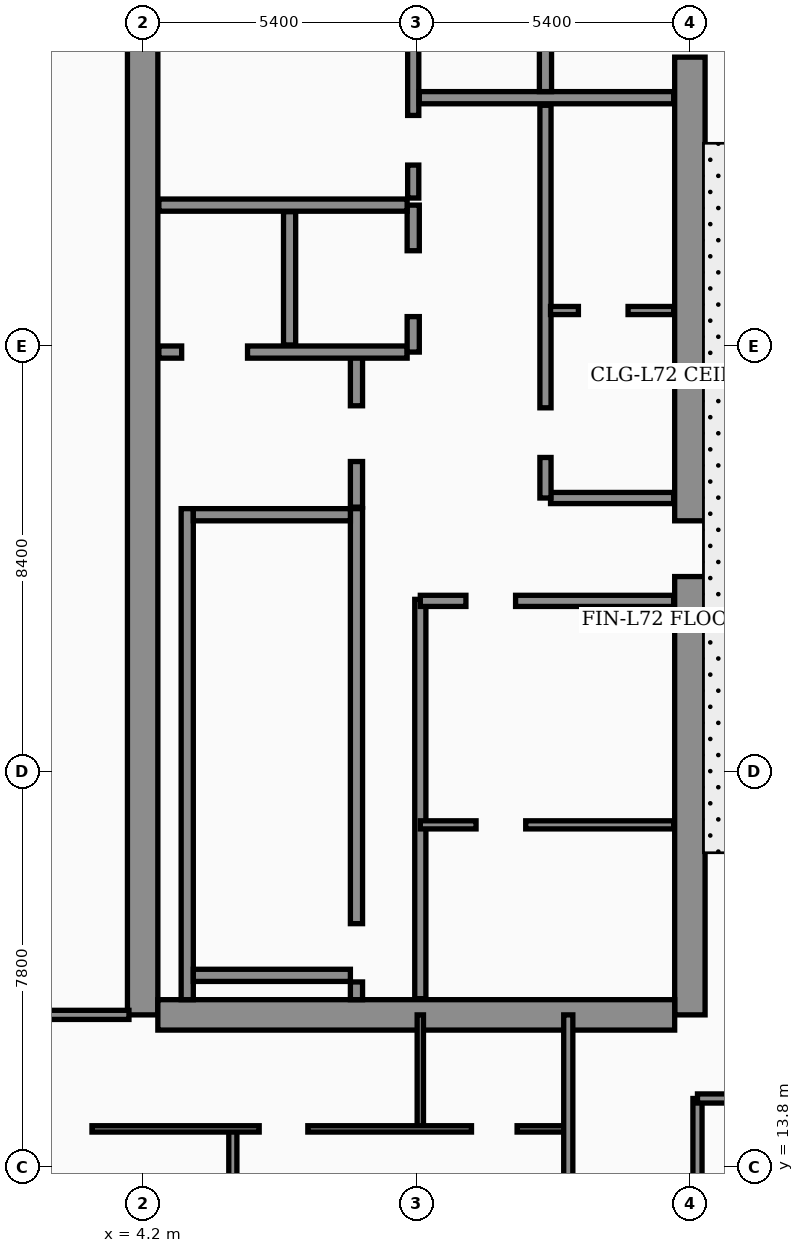
"""IFC4 building model, lengths in metres.
Left out: names, types, materials, properties, quantities, classifications, styles, units other than length and angle.
Written with IfcOpenShell. Run it as: python <this file> out.ifc"""

import sys

from ifc_helpers import new_model, si_unit, direction, frame, frame_2d, origin, place, context, subcontext, project, spatial, rectangle, extrude, element, fill, save


model = new_model("IFC4")
c1 = context("Model", 3, precision=1e-05, world=origin(), true_north=direction((0.0, 1.0)))
c2 = subcontext(c1, "Body", "Model", "MODEL_VIEW")
j1 = project(units=[si_unit("LENGTHUNIT", "METRE"), si_unit("PLANEANGLEUNIT", "RADIAN")], contexts=[c1])
p1 = place(None, origin())
s1 = spatial("IfcSite", under=j1, at=p1, CompositionType="ELEMENT")
p2 = place(p1, origin())
s2 = spatial("IfcBuilding", under=s1, at=p2, CompositionType="ELEMENT")
p3 = place(p2, frame((0.0, 0.0, 291.1)))
s3 = spatial("IfcBuildingStorey", under=s2, at=p3, CompositionType="ELEMENT", Elevation=291.1)
p4 = place(p3, frame((4.2, 16.8, 0.0), z_axis=(0.0, 0.0, 1.0), x_axis=(0.0, 1.0, 0.0)))
e1 = element("IfcWall", 1, at=p4, inside=s3, PredefinedType="SHEAR", context=c2, shape_type="SweptSolid", body=[
    extrude(rectangle(XDim=21.6, YDim=0.6, at=frame_2d((10.8, 0.0))), origin(), (0.0, 0.0, 1.0), 3.56),
])
p5 = place(p3, frame((15.0, 16.8, 0.0), z_axis=(0.0, 0.0, 1.0), x_axis=(0.0, 1.0, 0.0)))
e2 = element("IfcWall", 2, at=p5, inside=s3, PredefinedType="SHEAR", context=c2, shape_type="SweptSolid", body=[
    extrude(rectangle(XDim=21.6, YDim=0.6, at=frame_2d((10.8, 0.0))), origin(), (0.0, 0.0, 1.0), 3.56),
])
p6 = place(p5, frame((8.65, 0.0, 0.0)))
e3 = element("IfcOpeningElement", 3, at=p6, cuts=e2, PredefinedType="OPENING", context=c2, shape_type="SweptSolid", body=[
    extrude(rectangle(XDim=1.1, YDim=2.2, at=frame_2d((0.55, 1.1))), frame((0.0, 0.31, 0.0), z_axis=(0.0, -1.0, 0.0), x_axis=(1.0, 0.0, 0.0)), (0.0, 0.0, 1.0), 0.62),
])
p7 = place(p5, frame((18.9, 0.0, 0.0)))
e4 = element("IfcOpeningElement", 4, at=p7, cuts=e2, PredefinedType="OPENING", context=c2, shape_type="SweptSolid", body=[
    extrude(rectangle(XDim=1.1, YDim=2.2, at=frame_2d((0.55, 1.1))), frame((0.0, 0.31, 0.0), z_axis=(0.0, -1.0, 0.0), x_axis=(1.0, 0.0, 0.0)), (0.0, 0.0, 1.0), 0.62),
])
p8 = place(p3, frame((4.5, 16.8, 0.0), z_axis=(0.0, 0.0, 1.0), x_axis=(1.0, 0.0, 0.0)))
e5 = element("IfcWall", 5, at=p8, inside=s3, PredefinedType="SHEAR", context=c2, shape_type="SweptSolid", body=[
    extrude(rectangle(XDim=10.2, YDim=0.6, at=frame_2d((5.1, 0.0))), origin(), (0.0, 0.0, 1.0), 3.56),
])
p9 = place(p3, frame((5.08, 17.1, 0.0), z_axis=(0.0, 0.0, 1.0), x_axis=(0.0, 1.0, 0.0)))
e6 = element("IfcWall", 6, at=p9, inside=s3, PredefinedType="SOLIDWALL", context=c2, shape_type="SweptSolid", body=[
    extrude(rectangle(XDim=9.69, YDim=0.24, at=frame_2d((4.845, 0.0))), origin(), (0.0, 0.0, 1.0), 3.56),
])
p10 = place(p3, frame((8.42, 17.1, 0.0), z_axis=(0.0, 0.0, 1.0), x_axis=(0.0, 1.0, 0.0)))
e7 = element("IfcWall", 7, at=p10, inside=s3, PredefinedType="SOLIDWALL", context=c2, shape_type="SweptSolid", body=[
    extrude(rectangle(XDim=9.69, YDim=0.24, at=frame_2d((4.845, 0.0))), origin(), (0.0, 0.0, 1.0), 3.56),
])
p11 = place(p10, frame((0.35, 0.0, 0.0)))
e8 = element("IfcOpeningElement", 8, at=p11, cuts=e7, PredefinedType="OPENING", context=c2, shape_type="SweptSolid", body=[
    extrude(rectangle(XDim=1.15, YDim=2.2, at=frame_2d((0.575, 1.1))), frame((0.0, 0.13, 0.0), z_axis=(0.0, -1.0, 0.0), x_axis=(1.0, 0.0, 0.0)), (0.0, 0.0, 1.0), 0.26),
])
for number, where, z_axis, x_axis in (
    (9, (5.2, 17.58, 0.0), (0.0, 0.0, 1.0), (1.0, 0.0, 0.0)),
    (10, (5.2, 26.67, 0.0), (0.0, 0.0, 1.0), (1.0, 0.0, 0.0)),
):
    element("IfcWall", number, at=place(p3, frame(where, z_axis=z_axis, x_axis=x_axis)), inside=s3, PredefinedType="SOLIDWALL", context=c2, shape_type="SweptSolid", body=[
        extrude(rectangle(XDim=3.1, YDim=0.24, at=frame_2d((1.55, 0.0))), origin(), (0.0, 0.0, 1.0), 3.56),
    ])
p12 = place(p3, frame((8.42, 26.82, 0.0), z_axis=(0.0, 0.0, 1.0), x_axis=(0.0, 1.0, 0.0)))
e11 = element("IfcWall", 11, at=p12, inside=s3, PredefinedType="SOLIDWALL", context=c2, shape_type="SweptSolid", body=[
    extrude(rectangle(XDim=3.0, YDim=0.24, at=frame_2d((1.5, 0.0))), origin(), (0.0, 0.0, 1.0), 3.56),
])
p13 = place(p12, frame((0.9, 0.0, 0.0)))
e12 = element("IfcOpeningElement", 12, at=p13, cuts=e11, PredefinedType="OPENING", context=c2, shape_type="SweptSolid", body=[
    extrude(rectangle(XDim=1.1, YDim=2.2, at=frame_2d((0.55, 1.1))), frame((0.0, 0.13, 0.0), z_axis=(0.0, -1.0, 0.0), x_axis=(1.0, 0.0, 0.0)), (0.0, 0.0, 1.0), 0.26),
])
p14 = place(p3, frame((4.52, 29.88, 0.0), z_axis=(0.0, 0.0, 1.0), x_axis=(1.0, 0.0, 0.0)))
e13 = element("IfcWall", 13, at=p14, inside=s3, PredefinedType="SOLIDWALL", context=c2, shape_type="SweptSolid", body=[
    extrude(rectangle(XDim=4.9, YDim=0.24, at=frame_2d((2.45, 0.0))), origin(), (0.0, 0.0, 1.0), 3.56),
])
p15 = place(p14, frame((0.45, 0.0, 0.0)))
e14 = element("IfcOpeningElement", 14, at=p15, cuts=e13, PredefinedType="OPENING", context=c2, shape_type="SweptSolid", body=[
    extrude(rectangle(XDim=1.3, YDim=2.35, at=frame_2d((0.65, 1.175))), frame((0.0, 0.13, 0.0), z_axis=(0.0, -1.0, 0.0), x_axis=(1.0, 0.0, 0.0)), (0.0, 0.0, 1.0), 0.26),
])
p16 = place(p3, frame((7.1, 30.02, 0.0), z_axis=(0.0, 0.0, 1.0), x_axis=(0.0, 1.0, 0.0)))
e15 = element("IfcWall", 15, at=p16, inside=s3, PredefinedType="SOLIDWALL", context=c2, shape_type="SweptSolid", body=[
    extrude(rectangle(XDim=2.63, YDim=0.24, at=frame_2d((1.315, 0.0))), origin(), (0.0, 0.0, 1.0), 3.56),
])
p17 = place(p3, frame((9.54, 29.88, 0.0), z_axis=(0.0, 0.0, 1.0), x_axis=(0.0, 1.0, 0.0)))
e16 = element("IfcWall", 16, at=p17, inside=s3, PredefinedType="SOLIDWALL", context=c2, shape_type="SweptSolid", body=[
    extrude(rectangle(XDim=2.9, YDim=0.24, at=frame_2d((1.45, 0.0))), origin(), (0.0, 0.0, 1.0), 3.56),
])
p18 = place(p17, frame((0.7, 0.0, 0.0)))
e17 = element("IfcOpeningElement", 17, at=p18, cuts=e16, PredefinedType="OPENING", context=c2, shape_type="SweptSolid", body=[
    extrude(rectangle(XDim=1.3, YDim=2.35, at=frame_2d((0.65, 1.175))), frame((0.0, 0.13, 0.0), z_axis=(0.0, -1.0, 0.0), x_axis=(1.0, 0.0, 0.0)), (0.0, 0.0, 1.0), 0.26),
])
p19 = place(p3, frame((4.52, 32.78, 0.0), z_axis=(0.0, 0.0, 1.0), x_axis=(1.0, 0.0, 0.0)))
e18 = element("IfcWall", 18, at=p19, inside=s3, PredefinedType="SOLIDWALL", context=c2, shape_type="SweptSolid", body=[
    extrude(rectangle(XDim=4.9, YDim=0.24, at=frame_2d((2.45, 0.0))), origin(), (0.0, 0.0, 1.0), 3.19),
])
p20 = place(p3, frame((9.68, 17.12, 0.0), z_axis=(0.0, 0.0, 1.0), x_axis=(0.0, 1.0, 0.0)))
e19 = element("IfcWall", 19, at=p20, inside=s3, PredefinedType="SOLIDWALL", context=c2, shape_type="SweptSolid", body=[
    extrude(rectangle(XDim=7.88, YDim=0.22, at=frame_2d((3.94, 0.0))), origin(), (0.0, 0.0, 1.0), 3.56),
])
p21 = place(p3, frame((9.54, 32.92, 0.0), z_axis=(0.0, 0.0, 1.0), x_axis=(0.0, 1.0, 0.0)))
e20 = element("IfcWall", 20, at=p21, inside=s3, PredefinedType="SOLIDWALL", context=c2, shape_type="SweptSolid", body=[
    extrude(rectangle(XDim=5.16, YDim=0.22, at=frame_2d((2.58, 0.0))), origin(), (0.0, 0.0, 1.0), 3.56),
])
p22 = place(p21, frame((0.65, 0.0, 0.0)))
e21 = element("IfcOpeningElement", 21, at=p22, cuts=e20, PredefinedType="OPENING", context=c2, shape_type="SweptSolid", body=[
    extrude(rectangle(XDim=0.98, YDim=2.15, at=frame_2d((0.49, 1.075))), frame((0.0, 0.12, 0.0), z_axis=(0.0, -1.0, 0.0), x_axis=(1.0, 0.0, 0.0)), (0.0, 0.0, 1.0), 0.24),
])
p23 = place(p3, frame((9.68, 20.55, 0.0), z_axis=(0.0, 0.0, 1.0), x_axis=(1.0, 0.0, 0.0)))
e22 = element("IfcWall", 22, at=p23, inside=s3, PredefinedType="PARTITIONING", context=c2, shape_type="SweptSolid", body=[
    extrude(rectangle(XDim=5.0, YDim=0.16, at=frame_2d((2.5, 0.0))), origin(), (0.0, 0.0, 1.0), 3.56),
])
p24 = place(p23, frame((1.1, 0.0, 0.0)))
e23 = element("IfcOpeningElement", 23, at=p24, cuts=e22, PredefinedType="OPENING", context=c2, shape_type="SweptSolid", body=[
    extrude(rectangle(XDim=0.98, YDim=2.15, at=frame_2d((0.49, 1.075))), frame((0.0, 0.09, 0.0), z_axis=(0.0, -1.0, 0.0), x_axis=(1.0, 0.0, 0.0)), (0.0, 0.0, 1.0), 0.18),
])
p25 = place(p3, frame((9.68, 24.97, 0.0), z_axis=(0.0, 0.0, 1.0), x_axis=(1.0, 0.0, 0.0)))
e24 = element("IfcWall", 24, at=p25, inside=s3, PredefinedType="SOLIDWALL", context=c2, shape_type="SweptSolid", body=[
    extrude(rectangle(XDim=5.0, YDim=0.22, at=frame_2d((2.5, 0.0))), origin(), (0.0, 0.0, 1.0), 2.99),
])
p26 = place(p25, frame((0.9, 0.0, 0.0)))
e25 = element("IfcOpeningElement", 25, at=p26, cuts=e24, PredefinedType="OPENING", context=c2, shape_type="SweptSolid", body=[
    extrude(rectangle(XDim=0.98, YDim=2.15, at=frame_2d((0.49, 1.075))), frame((0.0, 0.12, 0.0), z_axis=(0.0, -1.0, 0.0), x_axis=(1.0, 0.0, 0.0)), (0.0, 0.0, 1.0), 0.24),
])
p27 = place(p3, frame((12.25, 27.0, 0.0), z_axis=(0.0, 0.0, 1.0), x_axis=(1.0, 0.0, 0.0)))
e26 = element("IfcWall", 26, at=p27, inside=s3, PredefinedType="SOLIDWALL", context=c2, shape_type="SweptSolid", body=[
    extrude(rectangle(XDim=2.43, YDim=0.22, at=frame_2d((1.215, 0.0))), origin(), (0.0, 0.0, 1.0), 3.56),
])
p28 = place(p3, frame((12.15, 27.0, 0.0), z_axis=(0.0, 0.0, 1.0), x_axis=(0.0, 1.0, 0.0)))
e27 = element("IfcWall", 27, at=p28, inside=s3, PredefinedType="SOLIDWALL", context=c2, shape_type="SweptSolid", body=[
    extrude(rectangle(XDim=7.75, YDim=0.22, at=frame_2d((3.875, 0.0))), origin(), (0.0, 0.0, 1.0), 3.56),
])
p29 = place(p28, frame((0.8, 0.0, 0.0)))
e28 = element("IfcOpeningElement", 28, at=p29, cuts=e27, PredefinedType="OPENING", context=c2, shape_type="SweptSolid", body=[
    extrude(rectangle(XDim=0.98, YDim=2.15, at=frame_2d((0.49, 1.075))), frame((0.0, 0.12, 0.0), z_axis=(0.0, -1.0, 0.0), x_axis=(1.0, 0.0, 0.0)), (0.0, 0.0, 1.0), 0.24),
])
p30 = place(p3, frame((12.25, 30.7, 0.0), z_axis=(0.0, 0.0, 1.0), x_axis=(1.0, 0.0, 0.0)))
e29 = element("IfcWall", 29, at=p30, inside=s3, PredefinedType="PARTITIONING", context=c2, shape_type="SweptSolid", body=[
    extrude(rectangle(XDim=2.43, YDim=0.16, at=frame_2d((1.215, 0.0))), origin(), (0.0, 0.0, 1.0), 3.56),
])
p31 = place(p30, frame((0.55, 0.0, 0.0)))
e30 = element("IfcOpeningElement", 30, at=p31, cuts=e29, PredefinedType="OPENING", context=c2, shape_type="SweptSolid", body=[
    extrude(rectangle(XDim=0.98, YDim=2.15, at=frame_2d((0.49, 1.075))), frame((0.0, 0.09, 0.0), z_axis=(0.0, -1.0, 0.0), x_axis=(1.0, 0.0, 0.0)), (0.0, 0.0, 1.0), 0.18),
])
p32 = place(p3, frame((9.66, 34.9, 0.0), z_axis=(0.0, 0.0, 1.0), x_axis=(1.0, 0.0, 0.0)))
e31 = element("IfcWall", 31, at=p32, inside=s3, PredefinedType="SOLIDWALL", context=c2, shape_type="SweptSolid", body=[
    extrude(rectangle(XDim=5.02, YDim=0.24, at=frame_2d((2.51, 0.0))), origin(), (0.0, 0.0, 1.0), 3.56),
])
p33 = place(p3, frame((12.15, 35.02, 0.0), z_axis=(0.0, 0.0, 1.0), x_axis=(0.0, 1.0, 0.0)))
e32 = element("IfcWall", 32, at=p33, inside=s3, PredefinedType="SOLIDWALL", context=c2, shape_type="SweptSolid", body=[
    extrude(rectangle(XDim=3.06, YDim=0.24, at=frame_2d((1.53, 0.0))), origin(), (0.0, 0.0, 1.0), 3.56),
])
p34 = place(p3, frame((0.08, 16.8, 0.0), z_axis=(0.0, 0.0, 1.0), x_axis=(1.0, 0.0, 0.0)))
e33 = element("IfcWall", 33, at=p34, inside=s3, PredefinedType="PARTITIONING", context=c2, shape_type="SweptSolid", body=[
    extrude(rectangle(XDim=3.85, YDim=0.18, at=frame_2d((1.925, 0.0))), origin(), (0.0, 0.0, 1.0), 2.99),
])
p35 = place(p3, frame((9.68, 14.55, 0.0), z_axis=(0.0, 0.0, 1.0), x_axis=(0.0, 1.0, 0.0)))
e34 = element("IfcWall", 34, at=p35, inside=s3, PredefinedType="PARTITIONING", context=c2, shape_type="SweptSolid", body=[
    extrude(rectangle(XDim=2.25, YDim=0.125, at=frame_2d((1.125, 0.0))), origin(), (0.0, 0.0, 1.0), 3.56),
])
p36 = place(p3, frame((5.98, 2.44, 0.0), z_axis=(0.0, 0.0, 1.0), x_axis=(0.0, 1.0, 0.0)))
e35 = element("IfcWall", 35, at=p36, inside=s3, PredefinedType="PARTITIONING", context=c2, shape_type="SweptSolid", body=[
    extrude(rectangle(XDim=12.11, YDim=0.16, at=frame_2d((6.055, 0.0))), origin(), (0.0, 0.0, 1.0), 3.09),
])
p37 = place(p36, frame((5.58, 0.0, 0.0)))
e36 = element("IfcOpeningElement", 36, at=p37, cuts=e35, PredefinedType="OPENING", context=c2, shape_type="SweptSolid", body=[
    extrude(rectangle(XDim=0.96, YDim=2.2, at=frame_2d((0.48, 1.1))), frame((0.0, 0.09, 0.0), z_axis=(0.0, -1.0, 0.0), x_axis=(1.0, 0.0, 0.0)), (0.0, 0.0, 1.0), 0.18),
])
p38 = place(p3, frame((3.2, 14.55, 0.0), z_axis=(0.0, 0.0, 1.0), x_axis=(1.0, 0.0, 0.0)))
e37 = element("IfcWall", 37, at=p38, inside=s3, PredefinedType="PARTITIONING", context=c2, shape_type="SweptSolid", body=[
    extrude(rectangle(XDim=9.4, YDim=0.125, at=frame_2d((4.7, 0.0))), origin(), (0.0, 0.0, 1.0), 2.99),
])
p39 = place(p38, frame((3.3, 0.0, 0.0)))
e38 = element("IfcOpeningElement", 38, at=p39, cuts=e37, PredefinedType="OPENING", context=c2, shape_type="SweptSolid", body=[
    extrude(rectangle(XDim=0.96, YDim=2.2, at=frame_2d((0.48, 1.1))), frame((0.0, 0.073, 0.0), z_axis=(0.0, -1.0, 0.0), x_axis=(1.0, 0.0, 0.0)), (0.0, 0.0, 1.0), 0.145),
])
p40 = place(p38, frame((7.49, 0.0, 0.0)))
e39 = element("IfcOpeningElement", 39, at=p40, cuts=e37, PredefinedType="OPENING", context=c2, shape_type="SweptSolid", body=[
    extrude(rectangle(XDim=0.9, YDim=2.15, at=frame_2d((0.45, 1.075))), frame((0.0, 0.073, 0.0), z_axis=(0.0, -1.0, 0.0), x_axis=(1.0, 0.0, 0.0)), (0.0, 0.0, 1.0), 0.145),
])
p41 = place(p3, frame((12.6, 2.44, 0.0), z_axis=(0.0, 0.0, 1.0), x_axis=(0.0, 1.0, 0.0)))
e40 = element("IfcWall", 40, at=p41, inside=s3, PredefinedType="PARTITIONING", context=c2, shape_type="SweptSolid", body=[
    extrude(rectangle(XDim=14.36, YDim=0.18, at=frame_2d((7.18, 0.0))), origin(), (0.0, 0.0, 1.0), 2.99),
])
p42 = place(p41, frame((3.01, 0.0, 0.0)))
e41 = element("IfcOpeningElement", 41, at=p42, cuts=e40, PredefinedType="OPENING", context=c2, shape_type="SweptSolid", body=[
    extrude(rectangle(XDim=1.02, YDim=2.2, at=frame_2d((0.51, 1.1))), frame((0.0, 0.1, 0.0), z_axis=(0.0, -1.0, 0.0), x_axis=(1.0, 0.0, 0.0)), (0.0, 0.0, 1.0), 0.2),
])
p43 = place(p3, frame((15.15, 2.44, 0.0), z_axis=(0.0, 0.0, 1.0), x_axis=(0.0, 1.0, 0.0)))
e42 = element("IfcWall", 42, at=p43, inside=s3, PredefinedType="PARTITIONING", context=c2, shape_type="SweptSolid", body=[
    extrude(rectangle(XDim=12.71, YDim=0.18, at=frame_2d((6.355, 0.0))), origin(), (0.0, 0.0, 1.0), 3.09),
])
p44 = place(p3, frame((15.15, 15.15, 0.0), z_axis=(0.0, 0.0, 1.0), x_axis=(1.0, 0.0, 0.0)))
e43 = element("IfcWall", 43, at=p44, inside=s3, PredefinedType="PARTITIONING", context=c2, shape_type="SweptSolid", body=[
    extrude(rectangle(XDim=6.45, YDim=0.18, at=frame_2d((3.225, 0.0))), origin(), (0.0, 0.0, 1.0), 2.59),
])
p45 = place(p44, frame((1.74, 0.0, 0.0)))
e44 = element("IfcOpeningElement", 44, at=p45, cuts=e43, PredefinedType="OPENING", context=c2, shape_type="SweptSolid", body=[
    extrude(rectangle(XDim=1.02, YDim=2.2, at=frame_2d((0.51, 1.1))), frame((0.0, 0.1, 0.0), z_axis=(0.0, -1.0, 0.0), x_axis=(1.0, 0.0, 0.0)), (0.0, 0.0, 1.0), 0.2),
])
p46 = place(p13, origin())
e45 = element("IfcDoor", 45, at=p46, inside=s3, OperationType="SINGLE_SWING_RIGHT", PredefinedType="DOOR", context=c2, shape_type="SweptSolid", body=[
    extrude(rectangle(XDim=1.1, YDim=2.2, at=frame_2d((0.55, 1.1))), frame((0.0, 0.025, 0.0), z_axis=(0.0, -1.0, 0.0), x_axis=(1.0, 0.0, 0.0)), (0.0, 0.0, 1.0), 0.05),
])
fill(e12, e45)
p47 = place(p15, origin())
e46 = element("IfcDoor", 46, at=p47, inside=s3, OperationType="DOUBLE_DOOR_SLIDING", PredefinedType="DOOR", context=c2, shape_type="SweptSolid", body=[
    extrude(rectangle(XDim=1.3, YDim=2.35, at=frame_2d((0.65, 1.175))), frame((0.0, 0.025, 0.0), z_axis=(0.0, -1.0, 0.0), x_axis=(1.0, 0.0, 0.0)), (0.0, 0.0, 1.0), 0.05),
])
fill(e14, e46)
p48 = place(p18, origin())
e47 = element("IfcDoor", 47, at=p48, inside=s3, OperationType="DOUBLE_DOOR_SLIDING", PredefinedType="DOOR", context=c2, shape_type="SweptSolid", body=[
    extrude(rectangle(XDim=1.3, YDim=2.35, at=frame_2d((0.65, 1.175))), frame((0.0, 0.025, 0.0), z_axis=(0.0, -1.0, 0.0), x_axis=(1.0, 0.0, 0.0)), (0.0, 0.0, 1.0), 0.05),
])
fill(e17, e47)
p49 = place(p22, origin())
e48 = element("IfcDoor", 48, at=p49, inside=s3, OperationType="SINGLE_SWING_LEFT", PredefinedType="DOOR", context=c2, shape_type="SweptSolid", body=[
    extrude(rectangle(XDim=0.98, YDim=2.15, at=frame_2d((0.49, 1.075))), frame((0.0, 0.025, 0.0), z_axis=(0.0, -1.0, 0.0), x_axis=(1.0, 0.0, 0.0)), (0.0, 0.0, 1.0), 0.05),
])
fill(e21, e48)
p50 = place(p24, origin())
e49 = element("IfcDoor", 49, at=p50, inside=s3, OperationType="SINGLE_SWING_LEFT", PredefinedType="DOOR", context=c2, shape_type="SweptSolid", body=[
    extrude(rectangle(XDim=0.98, YDim=2.15, at=frame_2d((0.49, 1.075))), frame((0.0, 0.025, 0.0), z_axis=(0.0, -1.0, 0.0), x_axis=(1.0, 0.0, 0.0)), (0.0, 0.0, 1.0), 0.05),
])
fill(e23, e49)
p51 = place(p26, origin())
e50 = element("IfcDoor", 50, at=p51, inside=s3, OperationType="SINGLE_SWING_RIGHT", PredefinedType="DOOR", context=c2, shape_type="SweptSolid", body=[
    extrude(rectangle(XDim=0.98, YDim=2.15, at=frame_2d((0.49, 1.075))), frame((0.0, 0.025, 0.0), z_axis=(0.0, -1.0, 0.0), x_axis=(1.0, 0.0, 0.0)), (0.0, 0.0, 1.0), 0.05),
])
fill(e25, e50)
p52 = place(p29, origin())
e51 = element("IfcDoor", 51, at=p52, inside=s3, OperationType="SINGLE_SWING_RIGHT", PredefinedType="DOOR", context=c2, shape_type="SweptSolid", body=[
    extrude(rectangle(XDim=0.98, YDim=2.15, at=frame_2d((0.49, 1.075))), frame((0.0, 0.025, 0.0), z_axis=(0.0, -1.0, 0.0), x_axis=(1.0, 0.0, 0.0)), (0.0, 0.0, 1.0), 0.05),
])
fill(e28, e51)
p53 = place(p31, origin())
e52 = element("IfcDoor", 52, at=p53, inside=s3, OperationType="SINGLE_SWING_LEFT", PredefinedType="DOOR", context=c2, shape_type="SweptSolid", body=[
    extrude(rectangle(XDim=0.98, YDim=2.15, at=frame_2d((0.49, 1.075))), frame((0.0, 0.025, 0.0), z_axis=(0.0, -1.0, 0.0), x_axis=(1.0, 0.0, 0.0)), (0.0, 0.0, 1.0), 0.05),
])
fill(e30, e52)
p54 = place(p39, origin())
e53 = element("IfcDoor", 53, at=p54, inside=s3, OperationType="SINGLE_SWING_LEFT", PredefinedType="DOOR", context=c2, shape_type="SweptSolid", body=[
    extrude(rectangle(XDim=0.96, YDim=2.2, at=frame_2d((0.48, 1.1))), frame((0.0, 0.025, 0.0), z_axis=(0.0, -1.0, 0.0), x_axis=(1.0, 0.0, 0.0)), (0.0, 0.0, 1.0), 0.05),
])
fill(e38, e53)
p55 = place(p40, origin())
e54 = element("IfcDoor", 54, at=p55, inside=s3, OperationType="SINGLE_SWING_RIGHT", PredefinedType="DOOR", context=c2, shape_type="SweptSolid", body=[
    extrude(rectangle(XDim=0.9, YDim=2.15, at=frame_2d((0.45, 1.075))), frame((0.0, 0.025, 0.0), z_axis=(0.0, -1.0, 0.0), x_axis=(1.0, 0.0, 0.0)), (0.0, 0.0, 1.0), 0.05),
])
fill(e39, e54)
p56 = place(p11, origin())
e55 = element("IfcDoor", 55, at=p56, inside=s3, OperationType="SINGLE_SWING_LEFT", PredefinedType="DOOR", context=c2, shape_type="SweptSolid", body=[
    extrude(rectangle(XDim=1.15, YDim=2.2, at=frame_2d((0.575, 1.1))), frame((0.0, 0.025, 0.0), z_axis=(0.0, -1.0, 0.0), x_axis=(1.0, 0.0, 0.0)), (0.0, 0.0, 1.0), 0.05),
])
fill(e8, e55)
p57 = place(p6, origin())
e56 = element("IfcDoor", 56, at=p57, inside=s3, OperationType="SINGLE_SWING_LEFT", PredefinedType="DOOR", context=c2, shape_type="SweptSolid", body=[
    extrude(rectangle(XDim=1.1, YDim=2.2, at=frame_2d((0.55, 1.1))), frame((0.0, 0.025, 0.0), z_axis=(0.0, -1.0, 0.0), x_axis=(1.0, 0.0, 0.0)), (0.0, 0.0, 1.0), 0.05),
])
fill(e3, e56)
p58 = place(p7, origin())
e57 = element("IfcDoor", 57, at=p58, inside=s3, OperationType="DOUBLE_DOOR_SLIDING", PredefinedType="DOOR", context=c2, shape_type="SweptSolid", body=[
    extrude(rectangle(XDim=1.1, YDim=2.2, at=frame_2d((0.55, 1.1))), frame((0.0, 0.025, 0.0), z_axis=(0.0, -1.0, 0.0), x_axis=(1.0, 0.0, 0.0)), (0.0, 0.0, 1.0), 0.05),
])
fill(e4, e57)
save(model, sys.argv[1])
